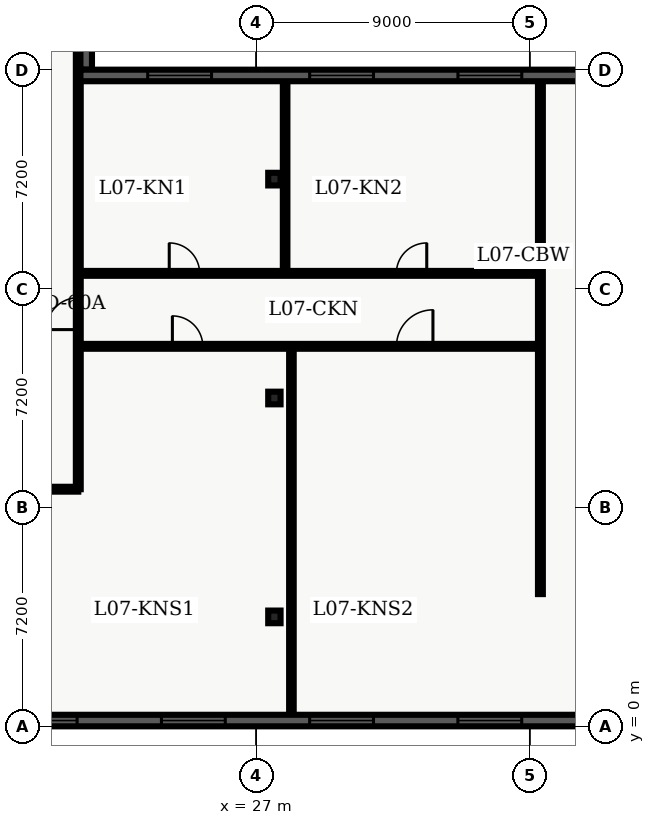
"""IFC4 building model, lengths in metres.
Left out: names, types, materials, properties, quantities, classifications, styles, units other than length and angle.
Written with IfcOpenShell. Run it as: python <this file> out.ifc"""

import sys

from ifc_helpers import new_model, entity, si_unit, converted_unit, direction, frame, origin_with_axes, origin_2d_with_axis, place, context, subcontext, project, spatial, polyline, rectangle, i_section, outline, extrude, element, fill, save


model = new_model("IFC4")
c1 = context("Model", 3, precision=1e-05, world=origin_with_axes(), true_north=direction((0.0, 1.0)))
c2 = subcontext(c1, "Body", "Model", "MODEL_VIEW")
j1 = project(units=[si_unit("LENGTHUNIT", "METRE"), converted_unit("PLANEANGLEUNIT", "DEGREE", entity("IfcPlaneAngleMeasure", 0.017), si_unit("PLANEANGLEUNIT", "RADIAN"), dimensions=[0, 0, 0, 0, 0, 0, 0])], contexts=[c1])
p1 = place(None, origin_with_axes())
s1 = spatial("IfcSite", under=j1, at=p1, CompositionType="ELEMENT")
p2 = place(p1, origin_with_axes())
s2 = spatial("IfcBuilding", under=s1, at=p2, CompositionType="ELEMENT")
p3 = place(p2, frame((0.0, 0.0, 32.7), z_axis=(0.0, 0.0, 1.0), x_axis=(1.0, 0.0, 0.0)))
s3 = spatial("IfcBuildingStorey", under=s2, at=p3, CompositionType="ELEMENT", Elevation=32.7)
for number, where, z_axis, x_axis in (
    (1, (27.6, 3.6, 0.0), (0.0, 0.0, 1.0), (1.0, 0.0, 0.0)),
    (2, (27.6, 10.8, 0.0), (0.0, 0.0, 1.0), (1.0, 0.0, 0.0)),
    (3, (27.6, 18.0, 0.0), (0.0, 0.0, 1.0), (1.0, 0.0, 0.0)),
):
    element("IfcColumn", number, at=place(p3, frame(where, z_axis=z_axis, x_axis=x_axis)), inside=s3, PredefinedType="COLUMN", context=c2, shape_type="SweptSolid", body=[
        extrude(i_section(OverallWidth=0.406, OverallDepth=0.416, WebThickness=0.03, FlangeThickness=0.048, FilletRadius=0.022, at=origin_2d_with_axis()), origin_with_axes(), (0.0, 0.0, 1.0), 3.9),
    ])
p4 = place(p3, frame((2.6, 7.8, 0.0), z_axis=(0.0, 0.0, 1.0), x_axis=(1.0, 0.0, 0.0)))
e4 = element("IfcWall", 4, at=p4, inside=s3, PredefinedType="PARTITIONING", context=c2, shape_type="SweptSolid", body=[
    extrude(outline(polyline([(0.0, -0.08), (18.55, -0.08), (18.55, 0.08), (0.0, 0.08), (0.0, -0.08)])), origin_with_axes(), (0.0, 0.0, 1.0), 2.7),
])
p5 = place(p4, frame((3.768, 0.0, 0.0), z_axis=(0.0, 0.0, 1.0), x_axis=(1.0, 0.0, 0.0)))
e5 = element("IfcOpeningElement", 5, at=p5, cuts=e4, PredefinedType="OPENING", context=c2, shape_type="SweptSolid", body=[
    extrude(rectangle(XDim=1.0, YDim=0.18, at=origin_2d_with_axis()), origin_with_axes(), (0.0, 0.0, 1.0), 2.15),
])
p6 = place(p4, frame((13.303, 0.0, 0.0), z_axis=(0.0, 0.0, 1.0), x_axis=(1.0, 0.0, 0.0)))
e6 = element("IfcOpeningElement", 6, at=p6, cuts=e4, PredefinedType="OPENING", context=c2, shape_type="SweptSolid", body=[
    extrude(rectangle(XDim=1.0, YDim=0.18, at=origin_2d_with_axis()), origin_with_axes(), (0.0, 0.0, 1.0), 2.15),
])
p7 = place(p3, frame((21.15, 7.8, 0.0), z_axis=(0.0, 0.0, 1.0), x_axis=(0.0, 1.0, 0.0)))
e7 = element("IfcWall", 7, at=p7, inside=s3, PredefinedType="PARTITIONING", context=c2, shape_type="SweptSolid", body=[
    extrude(outline(polyline([(0.0, -0.08), (32.7, -0.08), (32.7, 0.08), (0.0, 0.08), (0.0, -0.08)])), origin_with_axes(), (0.0, 0.0, 1.0), 2.7),
])
p8 = place(p7, frame((5.775, 0.0, 0.0), z_axis=(0.0, 0.0, 1.0), x_axis=(1.0, 0.0, 0.0)))
e8 = element("IfcOpeningElement", 8, at=p8, cuts=e7, PredefinedType="OPENING", context=c2, shape_type="SweptSolid", body=[
    extrude(rectangle(XDim=1.05, YDim=0.18, at=origin_2d_with_axis()), origin_with_axes(), (0.0, 0.0, 1.0), 2.15),
])
p9 = place(p3, frame((21.15, 12.5, 0.0), z_axis=(0.0, 0.0, 1.0), x_axis=(1.0, 0.0, 0.0)))
e9 = element("IfcWall", 9, at=p9, inside=s3, PredefinedType="PARTITIONING", context=c2, shape_type="SweptSolid", body=[
    extrude(outline(polyline([(0.0, -0.08), (15.2, -0.08), (15.2, 0.08), (0.0, 0.08), (0.0, -0.08)])), origin_with_axes(), (0.0, 0.0, 1.0), 2.7),
])
p10 = place(p9, frame((3.595, 0.0, 0.0), z_axis=(0.0, 0.0, 1.0), x_axis=(1.0, 0.0, 0.0)))
e10 = element("IfcOpeningElement", 10, at=p10, cuts=e9, PredefinedType="OPENING", context=c2, shape_type="SweptSolid", body=[
    extrude(rectangle(XDim=1.0, YDim=0.18, at=origin_2d_with_axis()), origin_with_axes(), (0.0, 0.0, 1.0), 2.15),
])
p11 = place(p9, frame((11.065, 0.0, 0.0), z_axis=(0.0, 0.0, 1.0), x_axis=(1.0, 0.0, 0.0)))
e11 = element("IfcOpeningElement", 11, at=p11, cuts=e9, PredefinedType="OPENING", context=c2, shape_type="SweptSolid", body=[
    extrude(rectangle(XDim=1.2, YDim=0.18, at=origin_2d_with_axis()), origin_with_axes(), (0.0, 0.0, 1.0), 2.2),
])
p12 = place(p3, frame((21.15, 14.9, 0.0), z_axis=(0.0, 0.0, 1.0), x_axis=(1.0, 0.0, 0.0)))
e12 = element("IfcWall", 12, at=p12, inside=s3, PredefinedType="PARTITIONING", context=c2, shape_type="SweptSolid", body=[
    extrude(outline(polyline([(0.0, -0.08), (15.2, -0.08), (15.2, 0.08), (0.0, 0.08), (0.0, -0.08)])), origin_with_axes(), (0.0, 0.0, 1.0), 2.7),
])
p13 = place(p12, frame((3.491, 0.0, 0.0), z_axis=(0.0, 0.0, 1.0), x_axis=(1.0, 0.0, 0.0)))
e13 = element("IfcOpeningElement", 13, at=p13, cuts=e12, PredefinedType="OPENING", context=c2, shape_type="SweptSolid", body=[
    extrude(rectangle(XDim=1.0, YDim=0.18, at=origin_2d_with_axis()), origin_with_axes(), (0.0, 0.0, 1.0), 2.15),
])
p14 = place(p12, frame((10.961, 0.0, 0.0), z_axis=(0.0, 0.0, 1.0), x_axis=(1.0, 0.0, 0.0)))
e14 = element("IfcOpeningElement", 14, at=p14, cuts=e12, PredefinedType="OPENING", context=c2, shape_type="SweptSolid", body=[
    extrude(rectangle(XDim=1.0, YDim=0.18, at=origin_2d_with_axis()), origin_with_axes(), (0.0, 0.0, 1.0), 2.15),
])
p15 = place(p3, frame((36.35, 4.35, 0.0), z_axis=(0.0, 0.0, 1.0), x_axis=(0.0, 1.0, 0.0)))
e15 = element("IfcWall", 15, at=p15, inside=s3, PredefinedType="PARTITIONING", context=c2, shape_type="SweptSolid", body=[
    extrude(outline(polyline([(0.0, -0.08), (16.95, -0.08), (16.95, 0.08), (0.0, 0.08), (0.0, -0.08)])), origin_with_axes(), (0.0, 0.0, 1.0), 2.7),
])
p16 = place(p3, frame((28.16, 0.36, 0.0), z_axis=(0.0, 0.0, 1.0), x_axis=(0.0, 1.0, 0.0)))
e16 = element("IfcWall", 16, at=p16, inside=s3, PredefinedType="PARTITIONING", context=c2, shape_type="SweptSolid", body=[
    extrude(outline(polyline([(0.0, -0.075), (12.02, -0.075), (12.02, 0.075), (0.0, 0.075), (0.0, -0.075)])), origin_with_axes(), (0.0, 0.0, 1.0), 2.7),
])
p17 = place(p3, frame((27.953, 15.02, 0.0), z_axis=(0.0, 0.0, 1.0), x_axis=(0.0, 1.0, 0.0)))
e17 = element("IfcWall", 17, at=p17, inside=s3, PredefinedType="PARTITIONING", context=c2, shape_type="SweptSolid", body=[
    extrude(outline(polyline([(0.0, -0.075), (6.205, -0.075), (6.205, 0.075), (0.0, 0.075), (0.0, -0.075)])), origin_with_axes(), (0.0, 0.0, 1.0), 2.7),
])
p18 = place(p3, frame((57.22, 0.19, 0.0), z_axis=(0.0, 0.0, 1.0), x_axis=(-1.0, 0.0, 0.0)))
e18 = element("IfcWall", 18, at=p18, inside=s3, PredefinedType="SOLIDWALL", context=c2, shape_type="SweptSolid", body=[
    extrude(outline(polyline([(0.0, -0.19), (54.82, -0.19), (54.82, 0.19), (0.0, 0.19), (0.0, -0.19)])), origin_with_axes(), (0.0, 0.0, 1.0), 3.66),
])
p19 = place(p18, frame((3.037, 0.0, 0.45), z_axis=(0.0, 0.0, 1.0), x_axis=(1.0, 0.0, 0.0)))
e19 = element("IfcOpeningElement", 19, at=p19, cuts=e18, PredefinedType="OPENING", context=c2, shape_type="SweptSolid", body=[
    extrude(rectangle(XDim=2.1, YDim=0.4, at=origin_2d_with_axis()), origin_with_axes(), (0.0, 0.0, 1.0), 2.2),
])
p20 = place(p18, frame((7.912, 0.0, 0.45), z_axis=(0.0, 0.0, 1.0), x_axis=(1.0, 0.0, 0.0)))
e20 = element("IfcOpeningElement", 20, at=p20, cuts=e18, PredefinedType="OPENING", context=c2, shape_type="SweptSolid", body=[
    extrude(rectangle(XDim=2.1, YDim=0.4, at=origin_2d_with_axis()), origin_with_axes(), (0.0, 0.0, 1.0), 2.2),
])
p21 = place(p18, frame((12.786, 0.0, 0.45), z_axis=(0.0, 0.0, 1.0), x_axis=(1.0, 0.0, 0.0)))
e21 = element("IfcOpeningElement", 21, at=p21, cuts=e18, PredefinedType="OPENING", context=c2, shape_type="SweptSolid", body=[
    extrude(rectangle(XDim=2.1, YDim=0.4, at=origin_2d_with_axis()), origin_with_axes(), (0.0, 0.0, 1.0), 2.2),
])
p22 = place(p18, frame((17.661, 0.0, 0.45), z_axis=(0.0, 0.0, 1.0), x_axis=(1.0, 0.0, 0.0)))
e22 = element("IfcOpeningElement", 22, at=p22, cuts=e18, PredefinedType="OPENING", context=c2, shape_type="SweptSolid", body=[
    extrude(rectangle(XDim=2.1, YDim=0.4, at=origin_2d_with_axis()), origin_with_axes(), (0.0, 0.0, 1.0), 2.2),
])
p23 = place(p18, frame((22.535, 0.0, 0.45), z_axis=(0.0, 0.0, 1.0), x_axis=(1.0, 0.0, 0.0)))
e23 = element("IfcOpeningElement", 23, at=p23, cuts=e18, PredefinedType="OPENING", context=c2, shape_type="SweptSolid", body=[
    extrude(rectangle(XDim=2.1, YDim=0.4, at=origin_2d_with_axis()), origin_with_axes(), (0.0, 0.0, 1.0), 2.2),
])
p24 = place(p18, frame((27.41, 0.0, 0.45), z_axis=(0.0, 0.0, 1.0), x_axis=(1.0, 0.0, 0.0)))
e24 = element("IfcOpeningElement", 24, at=p24, cuts=e18, PredefinedType="OPENING", context=c2, shape_type="SweptSolid", body=[
    extrude(rectangle(XDim=2.1, YDim=0.4, at=origin_2d_with_axis()), origin_with_axes(), (0.0, 0.0, 1.0), 2.2),
])
p25 = place(p18, frame((32.285, 0.0, 0.45), z_axis=(0.0, 0.0, 1.0), x_axis=(1.0, 0.0, 0.0)))
e25 = element("IfcOpeningElement", 25, at=p25, cuts=e18, PredefinedType="OPENING", context=c2, shape_type="SweptSolid", body=[
    extrude(rectangle(XDim=2.1, YDim=0.4, at=origin_2d_with_axis()), origin_with_axes(), (0.0, 0.0, 1.0), 2.2),
])
p26 = place(p18, frame((37.159, 0.0, 0.45), z_axis=(0.0, 0.0, 1.0), x_axis=(1.0, 0.0, 0.0)))
e26 = element("IfcOpeningElement", 26, at=p26, cuts=e18, PredefinedType="OPENING", context=c2, shape_type="SweptSolid", body=[
    extrude(rectangle(XDim=2.1, YDim=0.4, at=origin_2d_with_axis()), origin_with_axes(), (0.0, 0.0, 1.0), 2.2),
])
p27 = place(p18, frame((42.034, 0.0, 0.45), z_axis=(0.0, 0.0, 1.0), x_axis=(1.0, 0.0, 0.0)))
e27 = element("IfcOpeningElement", 27, at=p27, cuts=e18, PredefinedType="OPENING", context=c2, shape_type="SweptSolid", body=[
    extrude(rectangle(XDim=2.1, YDim=0.4, at=origin_2d_with_axis()), origin_with_axes(), (0.0, 0.0, 1.0), 2.2),
])
p28 = place(p18, frame((51.783, 0.0, 0.45), z_axis=(0.0, 0.0, 1.0), x_axis=(1.0, 0.0, 0.0)))
e28 = element("IfcOpeningElement", 28, at=p28, cuts=e18, PredefinedType="OPENING", context=c2, shape_type="SweptSolid", body=[
    extrude(rectangle(XDim=2.1, YDim=0.4, at=origin_2d_with_axis()), origin_with_axes(), (0.0, 0.0, 1.0), 2.2),
])
p29 = place(p3, frame((21.41, 45.82, 0.0), z_axis=(0.0, 0.0, 1.0), x_axis=(0.0, -1.0, 0.0)))
e29 = element("IfcWall", 29, at=p29, inside=s3, PredefinedType="SOLIDWALL", context=c2, shape_type="SweptSolid", body=[
    extrude(outline(polyline([(0.0, -0.19), (24.22, -0.19), (24.22, 0.19), (0.0, 0.19), (0.0, -0.19)])), origin_with_axes(), (0.0, 0.0, 1.0), 3.66),
])
p30 = place(p29, frame((2.902, 0.0, 0.45), z_axis=(0.0, 0.0, 1.0), x_axis=(1.0, 0.0, 0.0)))
e30 = element("IfcOpeningElement", 30, at=p30, cuts=e29, PredefinedType="OPENING", context=c2, shape_type="SweptSolid", body=[
    extrude(rectangle(XDim=2.1, YDim=0.4, at=origin_2d_with_axis()), origin_with_axes(), (0.0, 0.0, 1.0), 2.2),
])
p31 = place(p3, frame((21.22, 21.41, 0.0), z_axis=(0.0, 0.0, 1.0), x_axis=(1.0, 0.0, 0.0)))
e31 = element("IfcWall", 31, at=p31, inside=s3, PredefinedType="SOLIDWALL", context=c2, shape_type="SweptSolid", body=[
    extrude(outline(polyline([(0.0, -0.19), (17.18, -0.19), (17.18, 0.19), (0.0, 0.19), (0.0, -0.19)])), origin_with_axes(), (0.0, 0.0, 1.0), 3.66),
])
p32 = place(p31, frame((3.263, 0.0, 0.45), z_axis=(0.0, 0.0, 1.0), x_axis=(1.0, 0.0, 0.0)))
e32 = element("IfcOpeningElement", 32, at=p32, cuts=e31, PredefinedType="OPENING", context=c2, shape_type="SweptSolid", body=[
    extrude(rectangle(XDim=2.1, YDim=0.4, at=origin_2d_with_axis()), origin_with_axes(), (0.0, 0.0, 1.0), 2.2),
])
p33 = place(p31, frame((8.59, 0.0, 0.45), z_axis=(0.0, 0.0, 1.0), x_axis=(1.0, 0.0, 0.0)))
e33 = element("IfcOpeningElement", 33, at=p33, cuts=e31, PredefinedType="OPENING", context=c2, shape_type="SweptSolid", body=[
    extrude(rectangle(XDim=2.1, YDim=0.4, at=origin_2d_with_axis()), origin_with_axes(), (0.0, 0.0, 1.0), 2.2),
])
p34 = place(p31, frame((13.467, 0.0, 0.45), z_axis=(0.0, 0.0, 1.0), x_axis=(1.0, 0.0, 0.0)))
e34 = element("IfcOpeningElement", 34, at=p34, cuts=e31, PredefinedType="OPENING", context=c2, shape_type="SweptSolid", body=[
    extrude(rectangle(XDim=2.1, YDim=0.4, at=origin_2d_with_axis()), origin_with_axes(), (0.0, 0.0, 1.0), 2.2),
])
p35 = place(p7, frame((5.775, 0.0, 0.0), z_axis=(0.0, 0.0, 1.0), x_axis=(1.0, 0.0, 0.0)))
e35 = element("IfcDoor", 35, at=p35, inside=s3, OperationType="SINGLE_SWING_LEFT", PredefinedType="DOOR", context=c2, shape_type="SweptSolid", body=[
    extrude(rectangle(XDim=1.05, YDim=0.09, at=origin_2d_with_axis()), origin_with_axes(), (0.0, 0.0, 1.0), 2.15),
])
fill(e8, e35)
p36 = place(p9, frame((3.595, 0.0, 0.0), z_axis=(0.0, 0.0, 1.0), x_axis=(1.0, 0.0, 0.0)))
e36 = element("IfcDoor", 36, at=p36, inside=s3, OperationType="SINGLE_SWING_LEFT", PredefinedType="DOOR", context=c2, shape_type="SweptSolid", body=[
    extrude(rectangle(XDim=1.0, YDim=0.09, at=origin_2d_with_axis()), origin_with_axes(), (0.0, 0.0, 1.0), 2.15),
])
fill(e10, e36)
p37 = place(p9, frame((11.065, 0.0, 0.0), z_axis=(0.0, 0.0, 1.0), x_axis=(1.0, 0.0, 0.0)))
e37 = element("IfcDoor", 37, at=p37, inside=s3, OperationType="SINGLE_SWING_RIGHT", PredefinedType="DOOR", context=c2, shape_type="SweptSolid", body=[
    extrude(rectangle(XDim=1.2, YDim=0.09, at=origin_2d_with_axis()), origin_with_axes(), (0.0, 0.0, 1.0), 2.2),
])
fill(e11, e37)
p38 = place(p12, frame((3.491, 0.0, 0.0), z_axis=(0.0, 0.0, 1.0), x_axis=(1.0, 0.0, 0.0)))
e38 = element("IfcDoor", 38, at=p38, inside=s3, OperationType="SINGLE_SWING_LEFT", PredefinedType="DOOR", context=c2, shape_type="SweptSolid", body=[
    extrude(rectangle(XDim=1.0, YDim=0.09, at=origin_2d_with_axis()), origin_with_axes(), (0.0, 0.0, 1.0), 2.15),
])
fill(e13, e38)
p39 = place(p12, frame((10.961, 0.0, 0.0), z_axis=(0.0, 0.0, 1.0), x_axis=(1.0, 0.0, 0.0)))
e39 = element("IfcDoor", 39, at=p39, inside=s3, OperationType="SINGLE_SWING_RIGHT", PredefinedType="DOOR", context=c2, shape_type="SweptSolid", body=[
    extrude(rectangle(XDim=1.0, YDim=0.09, at=origin_2d_with_axis()), origin_with_axes(), (0.0, 0.0, 1.0), 2.15),
])
fill(e14, e39)
p40 = place(p18, frame((22.535, 0.0, 0.45), z_axis=(0.0, 0.0, 1.0), x_axis=(1.0, 0.0, 0.0)))
e40 = element("IfcWindow", 40, at=p40, inside=s3, PredefinedType="WINDOW", context=c2, shape_type="SweptSolid", body=[
    extrude(rectangle(XDim=2.1, YDim=0.09, at=origin_2d_with_axis()), origin_with_axes(), (0.0, 0.0, 1.0), 2.2),
])
fill(e23, e40)
p41 = place(p18, frame((27.41, 0.0, 0.45), z_axis=(0.0, 0.0, 1.0), x_axis=(1.0, 0.0, 0.0)))
e41 = element("IfcWindow", 41, at=p41, inside=s3, PredefinedType="WINDOW", context=c2, shape_type="SweptSolid", body=[
    extrude(rectangle(XDim=2.1, YDim=0.09, at=origin_2d_with_axis()), origin_with_axes(), (0.0, 0.0, 1.0), 2.2),
])
fill(e24, e41)
p42 = place(p18, frame((32.285, 0.0, 0.45), z_axis=(0.0, 0.0, 1.0), x_axis=(1.0, 0.0, 0.0)))
e42 = element("IfcWindow", 42, at=p42, inside=s3, PredefinedType="WINDOW", context=c2, shape_type="SweptSolid", body=[
    extrude(rectangle(XDim=2.1, YDim=0.09, at=origin_2d_with_axis()), origin_with_axes(), (0.0, 0.0, 1.0), 2.2),
])
fill(e25, e42)
p43 = place(p18, frame((37.159, 0.0, 0.45), z_axis=(0.0, 0.0, 1.0), x_axis=(1.0, 0.0, 0.0)))
e43 = element("IfcWindow", 43, at=p43, inside=s3, PredefinedType="WINDOW", context=c2, shape_type="SweptSolid", body=[
    extrude(rectangle(XDim=2.1, YDim=0.09, at=origin_2d_with_axis()), origin_with_axes(), (0.0, 0.0, 1.0), 2.2),
])
fill(e26, e43)
p44 = place(p31, frame((3.263, 0.0, 0.45), z_axis=(0.0, 0.0, 1.0), x_axis=(1.0, 0.0, 0.0)))
e44 = element("IfcWindow", 44, at=p44, inside=s3, PredefinedType="WINDOW", context=c2, shape_type="SweptSolid", body=[
    extrude(rectangle(XDim=2.1, YDim=0.09, at=origin_2d_with_axis()), origin_with_axes(), (0.0, 0.0, 1.0), 2.2),
])
fill(e32, e44)
p45 = place(p31, frame((8.59, 0.0, 0.45), z_axis=(0.0, 0.0, 1.0), x_axis=(1.0, 0.0, 0.0)))
e45 = element("IfcWindow", 45, at=p45, inside=s3, PredefinedType="WINDOW", context=c2, shape_type="SweptSolid", body=[
    extrude(rectangle(XDim=2.1, YDim=0.09, at=origin_2d_with_axis()), origin_with_axes(), (0.0, 0.0, 1.0), 2.2),
])
fill(e33, e45)
p46 = place(p31, frame((13.467, 0.0, 0.45), z_axis=(0.0, 0.0, 1.0), x_axis=(1.0, 0.0, 0.0)))
e46 = element("IfcWindow", 46, at=p46, inside=s3, PredefinedType="WINDOW", context=c2, shape_type="SweptSolid", body=[
    extrude(rectangle(XDim=2.1, YDim=0.09, at=origin_2d_with_axis()), origin_with_axes(), (0.0, 0.0, 1.0), 2.2),
])
fill(e34, e46)
save(model, sys.argv[1])
